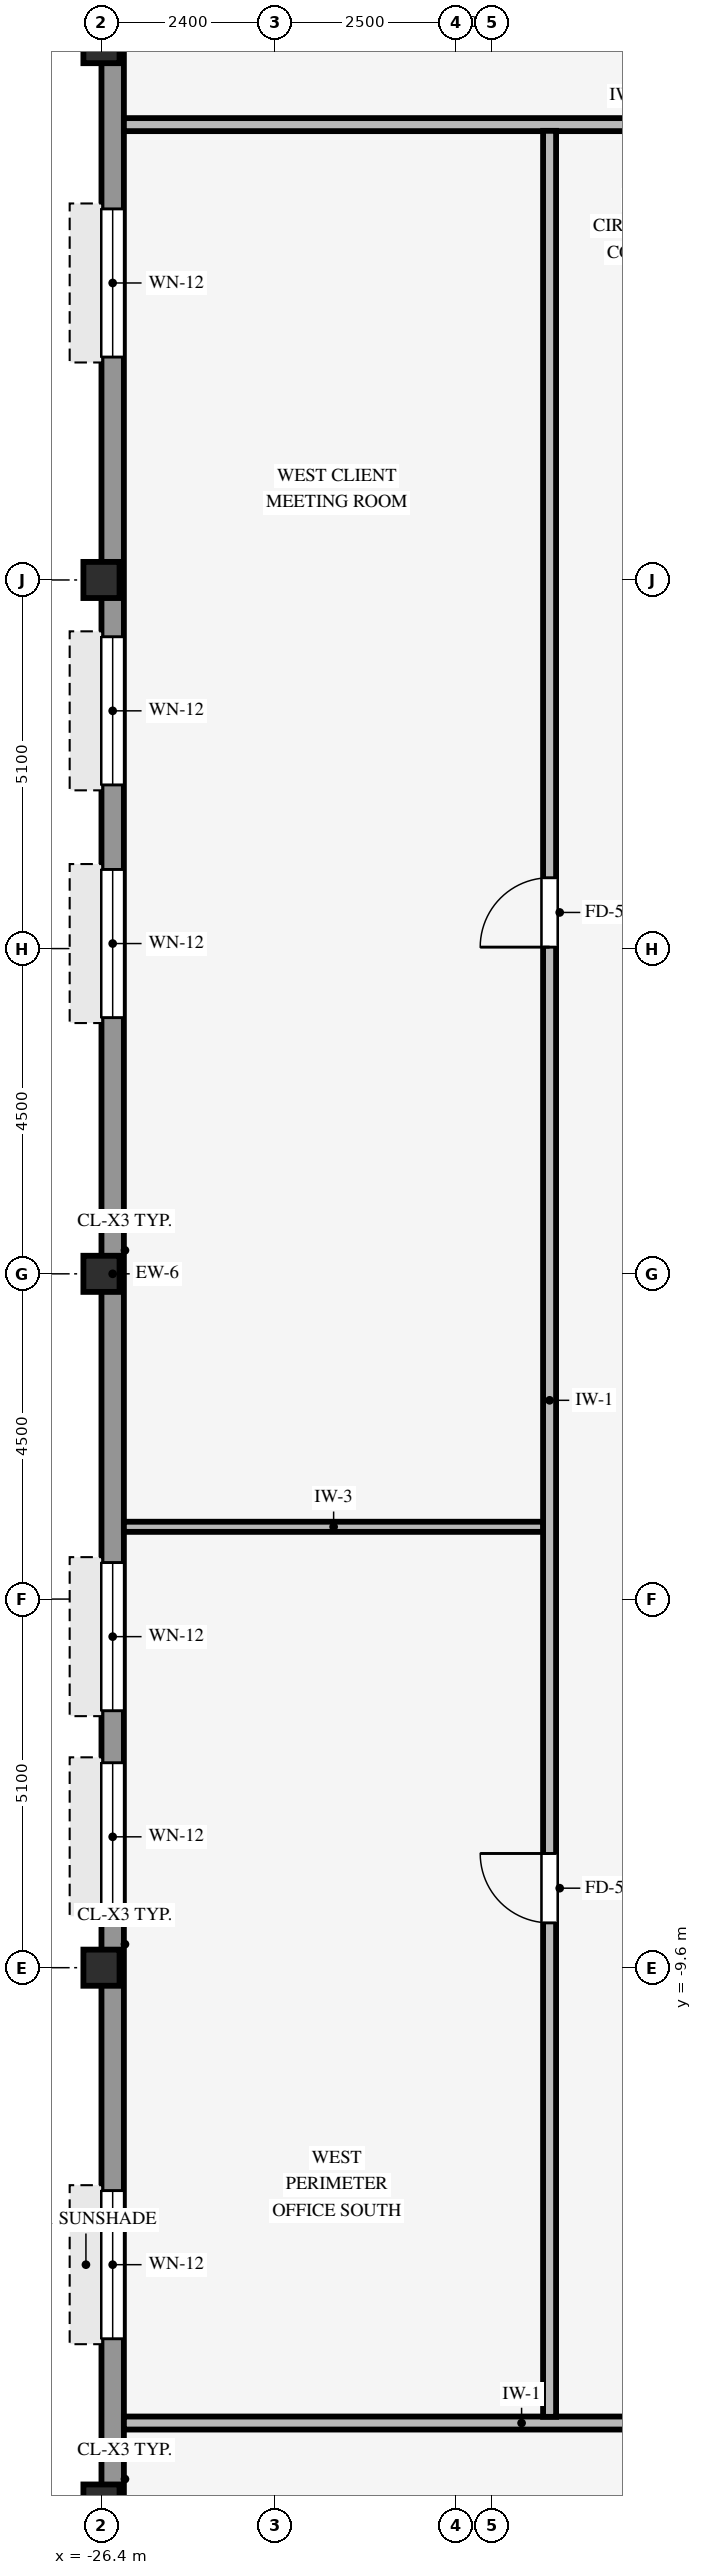
"""IFC4 building model, lengths in metres.
Left out: names, types, materials, properties, quantities, classifications, styles, units other than length and angle.
Written with IfcOpenShell. Run it as: python <this file> out.ifc"""

import sys

from ifc_helpers import new_model, si_unit, direction, frame, frame_2d, origin, origin_2d, place, context, subcontext, project, spatial, rectangle, hollow_rectangle, extrude, source, transform, mapped, element, fill, save


model = new_model("IFC4")
c1 = context("Model", 3, precision=1e-05, world=origin(), true_north=direction((0.0, 1.0)))
c2 = subcontext(c1, "Body", "Model", "MODEL_VIEW")
j1 = project(units=[si_unit("LENGTHUNIT", "METRE"), si_unit("PLANEANGLEUNIT", "RADIAN")], contexts=[c1])
p1 = place(None, origin())
s1 = spatial("IfcSite", under=j1, at=p1, CompositionType="ELEMENT")
p2 = place(p1, origin())
s2 = spatial("IfcBuilding", under=s1, at=p2, CompositionType="ELEMENT")
p3 = place(p2, frame((0.0, 0.0, 220.1)))
s3 = spatial("IfcBuildingStorey", under=s2, at=p3, CompositionType="ELEMENT", Elevation=220.1)
for number, where, z_axis, x_axis in (
    (1, (-26.4, -17.0, 0.0), (0.0, 0.0, 1.0), (1.0, 0.0, 0.0)),
    (2, (-26.4, -9.6, 0.0), (0.0, 0.0, 1.0), (1.0, 0.0, 0.0)),
    (3, (-26.4, 0.0, 0.0), (0.0, 0.0, 1.0), (1.0, 0.0, 0.0)),
    (4, (-26.4, 9.6, 0.0), (0.0, 0.0, 1.0), (1.0, 0.0, 0.0)),
    (5, (-26.4, 17.0, 0.0), (0.0, 0.0, 1.0), (1.0, 0.0, 0.0)),
):
    element("IfcColumn", number, at=place(p3, frame(where, z_axis=z_axis, x_axis=x_axis)), inside=s3, PredefinedType="COLUMN", context=c2, shape_type="SweptSolid", body=[
        extrude(hollow_rectangle(XDim=0.5, YDim=0.5, WallThickness=0.032, InnerFilletRadius=0.032, OuterFilletRadius=0.064, at=origin_2d()), origin(), (0.0, 0.0, 1.0), 3.37),
    ])
p4 = place(p3, frame((-26.245, -16.994, 0.0), z_axis=(0.0, 0.0, 1.0), x_axis=(0.0, 1.0, 0.0)))
e6 = element("IfcWall", 6, at=p4, inside=s3, PredefinedType="STANDARD", context=c2, shape_type="SweptSolid", body=[
    extrude(rectangle(XDim=33.988, YDim=0.31, at=frame_2d((16.994, 0.0))), origin(), (0.0, 0.0, 1.0), 2.705),
])
p5 = place(p4, frame((2.26, 0.0, 0.8)))
e7 = element("IfcOpeningElement", 7, at=p5, cuts=e6, PredefinedType="OPENING", context=c2, shape_type="SweptSolid", body=[
    extrude(rectangle(XDim=2.05, YDim=1.52, at=frame_2d((1.025, 0.76))), frame((0.0, 0.165, 0.0), z_axis=(0.0, -1.0, 0.0), x_axis=(1.0, 0.0, 0.0)), (0.0, 0.0, 1.0), 0.33),
])
p6 = place(p4, frame((8.18, 0.0, 0.8)))
e8 = element("IfcOpeningElement", 8, at=p6, cuts=e6, PredefinedType="OPENING", context=c2, shape_type="SweptSolid", body=[
    extrude(rectangle(XDim=2.05, YDim=1.52, at=frame_2d((1.025, 0.76))), frame((0.0, 0.165, 0.0), z_axis=(0.0, -1.0, 0.0), x_axis=(1.0, 0.0, 0.0)), (0.0, 0.0, 1.0), 0.33),
])
p7 = place(p4, frame((10.949, 0.0, 0.8)))
e9 = element("IfcOpeningElement", 9, at=p7, cuts=e6, PredefinedType="OPENING", context=c2, shape_type="SweptSolid", body=[
    extrude(rectangle(XDim=2.05, YDim=1.52, at=frame_2d((1.025, 0.76))), frame((0.0, 0.165, 0.0), z_axis=(0.0, -1.0, 0.0), x_axis=(1.0, 0.0, 0.0)), (0.0, 0.0, 1.0), 0.33),
])
p8 = place(p4, frame((20.539, 0.0, 0.8)))
e10 = element("IfcOpeningElement", 10, at=p8, cuts=e6, PredefinedType="OPENING", context=c2, shape_type="SweptSolid", body=[
    extrude(rectangle(XDim=2.05, YDim=1.52, at=frame_2d((1.025, 0.76))), frame((0.0, 0.165, 0.0), z_axis=(0.0, -1.0, 0.0), x_axis=(1.0, 0.0, 0.0)), (0.0, 0.0, 1.0), 0.33),
])
p9 = place(p4, frame((23.758, 0.0, 0.8)))
e11 = element("IfcOpeningElement", 11, at=p9, cuts=e6, PredefinedType="OPENING", context=c2, shape_type="SweptSolid", body=[
    extrude(rectangle(XDim=2.05, YDim=1.52, at=frame_2d((1.025, 0.76))), frame((0.0, 0.165, 0.0), z_axis=(0.0, -1.0, 0.0), x_axis=(1.0, 0.0, 0.0)), (0.0, 0.0, 1.0), 0.33),
])
p10 = place(p4, frame((29.678, 0.0, 0.8)))
e12 = element("IfcOpeningElement", 12, at=p10, cuts=e6, PredefinedType="OPENING", context=c2, shape_type="SweptSolid", body=[
    extrude(rectangle(XDim=2.05, YDim=1.52, at=frame_2d((1.025, 0.76))), frame((0.0, 0.165, 0.0), z_axis=(0.0, -1.0, 0.0), x_axis=(1.0, 0.0, 0.0)), (0.0, 0.0, 1.0), 0.33),
])
p11 = place(p3, frame((-26.09, -15.9, 0.0), z_axis=(0.0, 0.0, 1.0), x_axis=(1.0, 0.0, 0.0)))
e13 = element("IfcWall", 13, at=p11, inside=s3, PredefinedType="PARTITIONING", context=c2, shape_type="SweptSolid", body=[
    extrude(rectangle(XDim=35.09, YDim=0.18, at=frame_2d((17.545, 0.0))), origin(), (0.0, 0.0, 1.0), 3.36),
])
p12 = place(p11, frame((23.605, 0.0, 0.0)))
e14 = element("IfcOpeningElement", 14, at=p12, cuts=e13, PredefinedType="OPENING", context=c2, shape_type="SweptSolid", body=[
    extrude(rectangle(XDim=0.96, YDim=2.1, at=frame_2d((0.48, 1.05))), frame((0.0, 0.1, 0.0), z_axis=(0.0, -1.0, 0.0), x_axis=(1.0, 0.0, 0.0)), (0.0, 0.0, 1.0), 0.2),
])
p13 = place(p11, frame((11.455, 0.0, 0.0)))
e15 = element("IfcOpeningElement", 15, at=p13, cuts=e13, PredefinedType="OPENING", context=c2, shape_type="SweptSolid", body=[
    extrude(rectangle(XDim=0.96, YDim=2.1, at=frame_2d((0.48, 1.05))), frame((0.0, 0.1, 0.0), z_axis=(0.0, -1.0, 0.0), x_axis=(1.0, 0.0, 0.0)), (0.0, 0.0, 1.0), 0.2),
])
p14 = place(p3, frame((-26.09, -3.5, 0.0), z_axis=(0.0, 0.0, 1.0), x_axis=(1.0, 0.0, 0.0)))
e16 = element("IfcWall", 16, at=p14, inside=s3, PredefinedType="PARTITIONING", context=c2, shape_type="SweptSolid", body=[
    extrude(rectangle(XDim=5.804, YDim=0.14, at=frame_2d((2.902, 0.0))), origin(), (0.0, 0.0, 1.0), 3.36),
])
p15 = place(p3, frame((-26.09, 15.9, 0.0), z_axis=(0.0, 0.0, 1.0), x_axis=(1.0, 0.0, 0.0)))
e17 = element("IfcWall", 17, at=p15, inside=s3, PredefinedType="PARTITIONING", context=c2, shape_type="SweptSolid", body=[
    extrude(rectangle(XDim=35.09, YDim=0.18, at=frame_2d((17.545, 0.0))), origin(), (0.0, 0.0, 1.0), 3.36),
])
p16 = place(p15, frame((14.415, 0.0, 0.0)))
e18 = element("IfcOpeningElement", 18, at=p16, cuts=e17, PredefinedType="OPENING", context=c2, shape_type="SweptSolid", body=[
    extrude(rectangle(XDim=0.96, YDim=2.1, at=frame_2d((0.48, 1.05))), frame((0.0, 0.1, 0.0), z_axis=(0.0, -1.0, 0.0), x_axis=(1.0, 0.0, 0.0)), (0.0, 0.0, 1.0), 0.2),
])
p17 = place(p15, frame((26.565, 0.0, 0.0)))
e19 = element("IfcOpeningElement", 19, at=p17, cuts=e17, PredefinedType="OPENING", context=c2, shape_type="SweptSolid", body=[
    extrude(rectangle(XDim=0.96, YDim=2.1, at=frame_2d((0.48, 1.05))), frame((0.0, 0.1, 0.0), z_axis=(0.0, -1.0, 0.0), x_axis=(1.0, 0.0, 0.0)), (0.0, 0.0, 1.0), 0.2),
])
p18 = place(p3, frame((-20.2, -15.814, 0.0), z_axis=(0.0, 0.0, 1.0), x_axis=(0.0, 1.0, 0.0)))
e20 = element("IfcWall", 20, at=p18, inside=s3, PredefinedType="PARTITIONING", context=c2, shape_type="SweptSolid", body=[
    extrude(rectangle(XDim=31.628, YDim=0.18, at=frame_2d((15.814, 0.0))), origin(), (0.0, 0.0, 1.0), 3.36),
])
p19 = place(p18, frame((20.334, 0.0, 0.0)))
e21 = element("IfcOpeningElement", 21, at=p19, cuts=e20, PredefinedType="OPENING", context=c2, shape_type="SweptSolid", body=[
    extrude(rectangle(XDim=0.96, YDim=2.1, at=frame_2d((0.48, 1.05))), frame((0.0, 0.1, 0.0), z_axis=(0.0, -1.0, 0.0), x_axis=(1.0, 0.0, 0.0)), (0.0, 0.0, 1.0), 0.2),
])
p20 = place(p18, frame((6.834, 0.0, 0.0)))
e22 = element("IfcOpeningElement", 22, at=p20, cuts=e20, PredefinedType="OPENING", context=c2, shape_type="SweptSolid", body=[
    extrude(rectangle(XDim=0.96, YDim=2.1, at=frame_2d((0.48, 1.05))), frame((0.0, 0.1, 0.0), z_axis=(0.0, -1.0, 0.0), x_axis=(1.0, 0.0, 0.0)), (0.0, 0.0, 1.0), 0.2),
])
m1 = source(origin(), c2, "Body", "SweptSolid", [
    extrude(rectangle(XDim=2.05, YDim=1.52, at=frame_2d((1.025, 0.76))), frame((0.0, 0.03, 0.0), z_axis=(0.0, -1.0, 0.0), x_axis=(1.0, 0.0, 0.0)), (0.0, 0.0, 1.0), 0.06),
])
p21 = place(p5, origin())
e23 = element("IfcWindow", 23, at=p21, inside=s3, PartitioningType="SINGLE_PANEL", PredefinedType="WINDOW", context=c2, shape_type="MappedRepresentation", body=[
    mapped(m1, transform((0.0, 0.0, 0.0), scale=1.0)),
])
fill(e7, e23)
p22 = place(p6, origin())
e24 = element("IfcWindow", 24, at=p22, inside=s3, PartitioningType="SINGLE_PANEL", PredefinedType="WINDOW", context=c2, shape_type="MappedRepresentation", body=[
    mapped(m1, transform((0.0, 0.0, 0.0), scale=1.0)),
])
fill(e8, e24)
p23 = place(p7, origin())
e25 = element("IfcWindow", 25, at=p23, inside=s3, PartitioningType="SINGLE_PANEL", PredefinedType="WINDOW", context=c2, shape_type="MappedRepresentation", body=[
    mapped(m1, transform((0.0, 0.0, 0.0), scale=1.0)),
])
fill(e9, e25)
p24 = place(p8, origin())
e26 = element("IfcWindow", 26, at=p24, inside=s3, PartitioningType="SINGLE_PANEL", PredefinedType="WINDOW", context=c2, shape_type="MappedRepresentation", body=[
    mapped(m1, transform((0.0, 0.0, 0.0), scale=1.0)),
])
fill(e10, e26)
p25 = place(p9, origin())
e27 = element("IfcWindow", 27, at=p25, inside=s3, PartitioningType="SINGLE_PANEL", PredefinedType="WINDOW", context=c2, shape_type="MappedRepresentation", body=[
    mapped(m1, transform((0.0, 0.0, 0.0), scale=1.0)),
])
fill(e11, e27)
p26 = place(p10, origin())
e28 = element("IfcWindow", 28, at=p26, inside=s3, PartitioningType="SINGLE_PANEL", PredefinedType="WINDOW", context=c2, shape_type="MappedRepresentation", body=[
    mapped(m1, transform((0.0, 0.0, 0.0), scale=1.0)),
])
fill(e12, e28)
m2 = source(origin(), c2, "Body", "SweptSolid", [
    extrude(rectangle(XDim=0.96, YDim=2.1, at=frame_2d((0.48, 1.05))), frame((0.0, 0.025, 0.0), z_axis=(0.0, -1.0, 0.0), x_axis=(1.0, 0.0, 0.0)), (0.0, 0.0, 1.0), 0.05),
])
p27 = place(p19, origin())
e29 = element("IfcDoor", 29, at=p27, inside=s3, OperationType="SINGLE_SWING_LEFT", PredefinedType="DOOR", context=c2, shape_type="MappedRepresentation", body=[
    mapped(m2, transform((0.0, 0.0, 0.0), scale=1.0)),
])
fill(e21, e29)
p28 = place(p20, origin())
e30 = element("IfcDoor", 30, at=p28, inside=s3, OperationType="SINGLE_SWING_RIGHT", PredefinedType="DOOR", context=c2, shape_type="MappedRepresentation", body=[
    mapped(m2, transform((0.0, 0.0, 0.0), scale=1.0)),
])
fill(e22, e30)
save(model, sys.argv[1])
